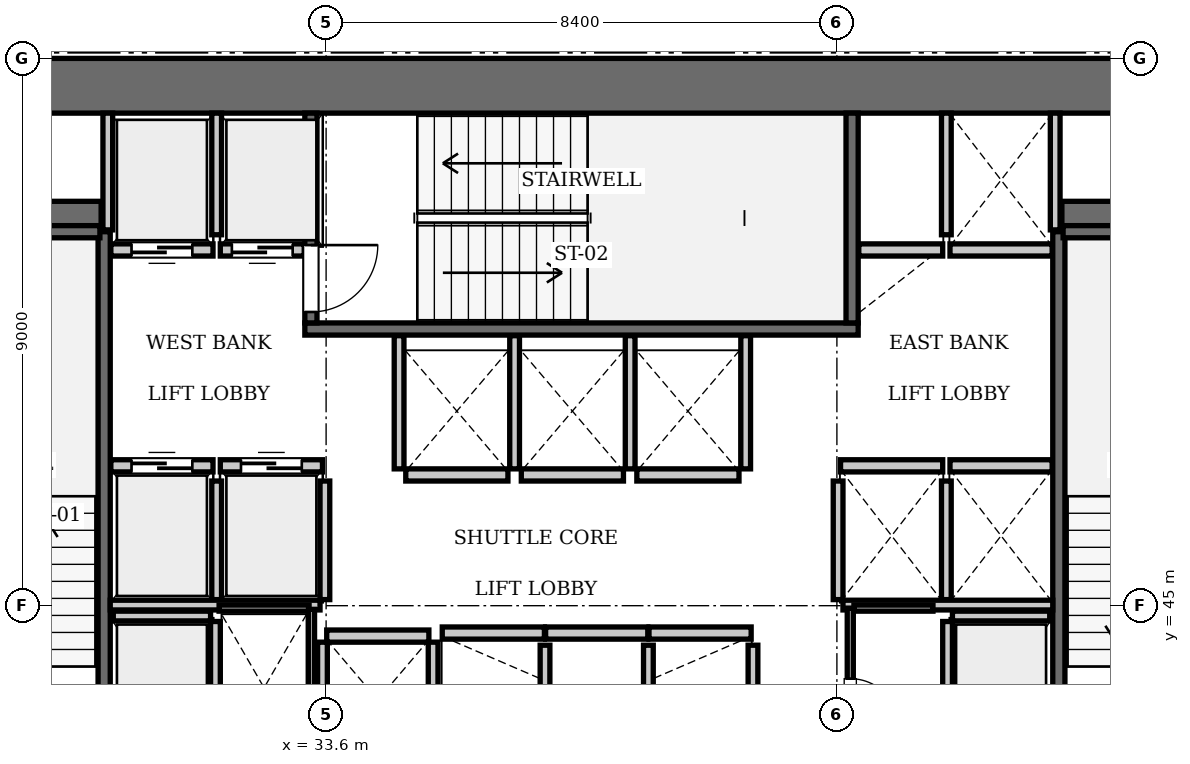
"""IFC4 building model, lengths in metres.
Left out: names, types, materials, properties, quantities, classifications, styles, units other than length and angle.
Written with IfcOpenShell. Run it as: python <this file> out.ifc"""

import sys

from ifc_helpers import new_model, si_unit, direction, frame, frame_2d, origin, place, context, subcontext, project, spatial, rectangle, extrude, element, fill, save


model = new_model("IFC4")
c1 = context("Model", 3, precision=1e-05, world=origin(), true_north=direction((0.0, 1.0)))
c2 = subcontext(c1, "Body", "Model", "MODEL_VIEW")
j1 = project(units=[si_unit("LENGTHUNIT", "METRE"), si_unit("PLANEANGLEUNIT", "RADIAN")], contexts=[c1])
p1 = place(None, origin())
s1 = spatial("IfcSite", under=j1, at=p1, CompositionType="ELEMENT")
p2 = place(p1, origin())
s2 = spatial("IfcBuilding", under=s1, at=p2, CompositionType="ELEMENT")
p3 = place(p2, frame((0.0, 0.0, 34.65)))
s3 = spatial("IfcBuildingStorey", under=s2, at=p3, CompositionType="ELEMENT", Elevation=34.65)
p4 = place(p3, frame((25.2, 53.55, 0.0), z_axis=(0.0, 0.0, 1.0), x_axis=(1.0, 0.0, 0.0)))
e1 = element("IfcWall", 1, at=p4, inside=s3, PredefinedType="SHEAR", context=c2, shape_type="SweptSolid", body=[
    extrude(rectangle(XDim=25.2, YDim=0.9, at=frame_2d((12.6, 0.0))), origin(), (0.0, 0.0, 1.0), 3.85),
])
p5 = place(p3, frame((26.1, 51.4, 0.0), z_axis=(0.0, 0.0, 1.0), x_axis=(1.0, 0.0, 0.0)))
e2 = element("IfcWall", 2, at=p5, inside=s3, PredefinedType="SHEAR", context=c2, shape_type="SweptSolid", body=[
    extrude(rectangle(XDim=3.8, YDim=0.5, at=frame_2d((1.9, 0.0))), origin(), (0.0, 0.0, 1.0), 3.85),
])
p6 = place(p3, frame((45.7, 51.4, 0.0), z_axis=(0.0, 0.0, 1.0), x_axis=(1.0, 0.0, 0.0)))
e3 = element("IfcWall", 3, at=p6, inside=s3, PredefinedType="SHEAR", context=c2, shape_type="SweptSolid", body=[
    extrude(rectangle(XDim=3.8, YDim=0.5, at=frame_2d((1.9, 0.0))), origin(), (0.0, 0.0, 1.0), 3.85),
])
p7 = place(p3, frame((29.95, 42.3, 0.0), z_axis=(0.0, 0.0, 1.0), x_axis=(0.0, 1.0, 0.0)))
e4 = element("IfcWall", 4, at=p7, inside=s3, PredefinedType="SOLIDWALL", context=c2, shape_type="SweptSolid", body=[
    extrude(rectangle(XDim=8.85, YDim=0.2, at=frame_2d((4.425, 0.0))), origin(), (0.0, 0.0, 1.0), 3.61),
])
p8 = place(p3, frame((26.38, 51.15, 0.0), z_axis=(0.0, 0.0, 1.0), x_axis=(1.0, 0.0, 0.0)))
e5 = element("IfcWall", 5, at=p8, inside=s3, PredefinedType="SOLIDWALL", context=c2, shape_type="SweptSolid", body=[
    extrude(rectangle(XDim=3.5, YDim=0.2, at=frame_2d((1.75, 0.0))), origin(), (0.0, 0.0, 1.0), 3.61),
])
p9 = place(p3, frame((33.25, 49.55, 0.0), z_axis=(0.0, 0.0, 1.0), x_axis=(1.0, 0.0, 0.0)))
e6 = element("IfcWall", 6, at=p9, inside=s3, PredefinedType="SOLIDWALL", context=c2, shape_type="SweptSolid", body=[
    extrude(rectangle(XDim=9.1, YDim=0.2, at=frame_2d((4.55, 0.0))), origin(), (0.0, 0.0, 1.0), 3.61),
])
p10 = place(p3, frame((42.25, 49.65, 0.0), z_axis=(0.0, 0.0, 1.0), x_axis=(0.0, 1.0, 0.0)))
e7 = element("IfcWall", 7, at=p10, inside=s3, PredefinedType="SOLIDWALL", context=c2, shape_type="SweptSolid", body=[
    extrude(rectangle(XDim=3.45, YDim=0.2, at=frame_2d((1.725, 0.0))), origin(), (0.0, 0.0, 1.0), 3.61),
])
p11 = place(p3, frame((33.35, 49.65, 0.0), z_axis=(0.0, 0.0, 1.0), x_axis=(0.0, 1.0, 0.0)))
e8 = element("IfcWall", 8, at=p11, inside=s3, PredefinedType="SOLIDWALL", context=c2, shape_type="SweptSolid", body=[
    extrude(rectangle(XDim=3.45, YDim=0.2, at=frame_2d((1.725, 0.0))), origin(), (0.0, 0.0, 1.0), 3.61),
])
p12 = place(p11, frame((0.18, 0.0, 0.0)))
e9 = element("IfcOpeningElement", 9, at=p12, cuts=e8, PredefinedType="OPENING", context=c2, shape_type="SweptSolid", body=[
    extrude(rectangle(XDim=1.1, YDim=2.15, at=frame_2d((0.55, 1.075))), frame((0.0, 0.11, 0.0), z_axis=(0.0, -1.0, 0.0), x_axis=(1.0, 0.0, 0.0)), (0.0, 0.0, 1.0), 0.22),
])
p13 = place(p3, frame((45.65, 42.3, 0.0), z_axis=(0.0, 0.0, 1.0), x_axis=(0.0, 1.0, 0.0)))
e10 = element("IfcWall", 10, at=p13, inside=s3, PredefinedType="SOLIDWALL", context=c2, shape_type="SweptSolid", body=[
    extrude(rectangle(XDim=8.85, YDim=0.2, at=frame_2d((4.425, 0.0))), origin(), (0.0, 0.0, 1.0), 3.61),
])
p14 = place(p3, frame((45.72, 51.15, 0.0), z_axis=(0.0, 0.0, 1.0), x_axis=(1.0, 0.0, 0.0)))
e11 = element("IfcWall", 11, at=p14, inside=s3, PredefinedType="SOLIDWALL", context=c2, shape_type="SweptSolid", body=[
    extrude(rectangle(XDim=3.5, YDim=0.2, at=frame_2d((1.75, 0.0))), origin(), (0.0, 0.0, 1.0), 3.61),
])
p15 = place(p3, frame((30.06, 47.3, 0.0), z_axis=(0.0, 0.0, 1.0), x_axis=(1.0, 0.0, 0.0)))
e12 = element("IfcWall", 12, at=p15, inside=s3, PredefinedType="SOLIDWALL", context=c2, shape_type="SweptSolid", body=[
    extrude(rectangle(XDim=1.68, YDim=0.2, at=frame_2d((0.84, 0.0))), origin(), (0.0, 0.0, 1.0), 3.61),
])
p16 = place(p15, frame((0.34, 0.0, 0.0)))
e13 = element("IfcOpeningElement", 13, at=p16, cuts=e12, PredefinedType="OPENING", context=c2, shape_type="SweptSolid", body=[
    extrude(rectangle(XDim=1.0, YDim=2.15, at=frame_2d((0.5, 1.075))), frame((0.0, 0.11, 0.0), z_axis=(0.0, -1.0, 0.0), x_axis=(1.0, 0.0, 0.0)), (0.0, 0.0, 1.0), 0.22),
])
p17 = place(p3, frame((31.86, 47.3, 0.0), z_axis=(0.0, 0.0, 1.0), x_axis=(1.0, 0.0, 0.0)))
e14 = element("IfcWall", 14, at=p17, inside=s3, PredefinedType="SOLIDWALL", context=c2, shape_type="SweptSolid", body=[
    extrude(rectangle(XDim=1.68, YDim=0.2, at=frame_2d((0.84, 0.0))), origin(), (0.0, 0.0, 1.0), 3.61),
])
p18 = place(p17, frame((0.34, 0.0, 0.0)))
e15 = element("IfcOpeningElement", 15, at=p18, cuts=e14, PredefinedType="OPENING", context=c2, shape_type="SweptSolid", body=[
    extrude(rectangle(XDim=1.0, YDim=2.15, at=frame_2d((0.5, 1.075))), frame((0.0, 0.11, 0.0), z_axis=(0.0, -1.0, 0.0), x_axis=(1.0, 0.0, 0.0)), (0.0, 0.0, 1.0), 0.22),
])
p19 = place(p3, frame((30.06, 50.85, 0.0), z_axis=(0.0, 0.0, 1.0), x_axis=(1.0, 0.0, 0.0)))
e16 = element("IfcWall", 16, at=p19, inside=s3, PredefinedType="SOLIDWALL", context=c2, shape_type="SweptSolid", body=[
    extrude(rectangle(XDim=1.68, YDim=0.2, at=frame_2d((0.84, 0.0))), origin(), (0.0, 0.0, 1.0), 3.61),
])
p20 = place(p19, frame((0.34, 0.0, 0.0)))
e17 = element("IfcOpeningElement", 17, at=p20, cuts=e16, PredefinedType="OPENING", context=c2, shape_type="SweptSolid", body=[
    extrude(rectangle(XDim=1.0, YDim=2.15, at=frame_2d((0.5, 1.075))), frame((0.0, 0.11, 0.0), z_axis=(0.0, -1.0, 0.0), x_axis=(1.0, 0.0, 0.0)), (0.0, 0.0, 1.0), 0.22),
])
p21 = place(p3, frame((31.86, 50.85, 0.0), z_axis=(0.0, 0.0, 1.0), x_axis=(1.0, 0.0, 0.0)))
e18 = element("IfcWall", 18, at=p21, inside=s3, PredefinedType="SOLIDWALL", context=c2, shape_type="SweptSolid", body=[
    extrude(rectangle(XDim=1.38, YDim=0.2, at=frame_2d((0.69, 0.0))), origin(), (0.0, 0.0, 1.0), 3.61),
])
p22 = place(p21, frame((0.19, 0.0, 0.0)))
e19 = element("IfcOpeningElement", 19, at=p22, cuts=e18, PredefinedType="OPENING", context=c2, shape_type="SweptSolid", body=[
    extrude(rectangle(XDim=1.0, YDim=2.15, at=frame_2d((0.5, 1.075))), frame((0.0, 0.11, 0.0), z_axis=(0.0, -1.0, 0.0), x_axis=(1.0, 0.0, 0.0)), (0.0, 0.0, 1.0), 0.22),
])
for number, where, z_axis, x_axis in (
    (20, (42.06, 47.3, 0.0), (0.0, 0.0, 1.0), (1.0, 0.0, 0.0)),
    (21, (43.86, 47.3, 0.0), (0.0, 0.0, 1.0), (1.0, 0.0, 0.0)),
):
    element("IfcWall", number, at=place(p3, frame(where, z_axis=z_axis, x_axis=x_axis)), inside=s3, PredefinedType="SOLIDWALL", context=c2, shape_type="SweptSolid", body=[
        extrude(rectangle(XDim=1.68, YDim=0.2, at=frame_2d((0.84, 0.0))), origin(), (0.0, 0.0, 1.0), 3.61),
    ])
p23 = place(p3, frame((42.36, 50.85, 0.0), z_axis=(0.0, 0.0, 1.0), x_axis=(1.0, 0.0, 0.0)))
e22 = element("IfcWall", 22, at=p23, inside=s3, PredefinedType="SOLIDWALL", context=c2, shape_type="SweptSolid", body=[
    extrude(rectangle(XDim=1.38, YDim=0.2, at=frame_2d((0.69, 0.0))), origin(), (0.0, 0.0, 1.0), 3.61),
])
for number, where, z_axis, x_axis in (
    (23, (43.86, 50.85, 0.0), (0.0, 0.0, 1.0), (1.0, 0.0, 0.0)),
    (24, (35.51, 44.55, 0.0), (0.0, 0.0, 1.0), (1.0, 0.0, 0.0)),
    (25, (37.21, 44.55, 0.0), (0.0, 0.0, 1.0), (1.0, 0.0, 0.0)),
):
    element("IfcWall", number, at=place(p3, frame(where, z_axis=z_axis, x_axis=x_axis)), inside=s3, PredefinedType="SOLIDWALL", context=c2, shape_type="SweptSolid", body=[
        extrude(rectangle(XDim=1.68, YDim=0.2, at=frame_2d((0.84, 0.0))), origin(), (0.0, 0.0, 1.0), 3.61),
    ])
for number, where, z_axis, x_axis in (
    (26, (38.91, 44.55, 0.0), (0.0, 0.0, 1.0), (1.0, 0.0, 0.0)),
    (27, (34.91, 47.15, 0.0), (0.0, 0.0, 1.0), (1.0, 0.0, 0.0)),
):
    element("IfcWall", number, at=place(p3, frame(where, z_axis=z_axis, x_axis=x_axis)), inside=s3, PredefinedType="SOLIDWALL", context=c2, shape_type="SweptSolid", body=[
        extrude(rectangle(XDim=1.68, YDim=0.2, at=frame_2d((0.84, 0.0))), origin(), (0.0, 0.0, 1.0), 3.61),
    ])
for number, where, z_axis, x_axis in (
    (28, (36.81, 47.15, 0.0), (0.0, 0.0, 1.0), (1.0, 0.0, 0.0)),
    (29, (38.71, 47.15, 0.0), (0.0, 0.0, 1.0), (1.0, 0.0, 0.0)),
    (30, (33.61, 44.5, 0.0), (0.0, 0.0, 1.0), (1.0, 0.0, 0.0)),
):
    element("IfcWall", number, at=place(p3, frame(where, z_axis=z_axis, x_axis=x_axis)), inside=s3, PredefinedType="SOLIDWALL", context=c2, shape_type="SweptSolid", body=[
        extrude(rectangle(XDim=1.68, YDim=0.2, at=frame_2d((0.84, 0.0))), origin(), (0.0, 0.0, 1.0), 3.61),
    ])
p24 = place(p3, frame((30.1, 44.83, 0.0), z_axis=(0.0, 0.0, 1.0), x_axis=(1.0, 0.0, 0.0)))
e31 = element("IfcWall", 31, at=p24, inside=s3, PredefinedType="SOLIDWALL", context=c2, shape_type="SweptSolid", body=[
    extrude(rectangle(XDim=1.6, YDim=0.16, at=frame_2d((0.8, 0.0))), origin(), (0.0, 0.0, 1.0), 3.61),
])
p25 = place(p3, frame((31.78, 42.3, 0.0), z_axis=(0.0, 0.0, 1.0), x_axis=(0.0, 1.0, 0.0)))
e32 = element("IfcWall", 32, at=p25, inside=s3, PredefinedType="SOLIDWALL", context=c2, shape_type="SweptSolid", body=[
    extrude(rectangle(XDim=2.44, YDim=0.16, at=frame_2d((1.22, 0.0))), origin(), (0.0, 0.0, 1.0), 3.61),
])
p26 = place(p3, frame((43.9, 44.83, 0.0), z_axis=(0.0, 0.0, 1.0), x_axis=(1.0, 0.0, 0.0)))
e33 = element("IfcWall", 33, at=p26, inside=s3, PredefinedType="SOLIDWALL", context=c2, shape_type="SweptSolid", body=[
    extrude(rectangle(XDim=1.6, YDim=0.16, at=frame_2d((0.8, 0.0))), origin(), (0.0, 0.0, 1.0), 3.61),
])
p27 = place(p3, frame((43.82, 42.3, 0.0), z_axis=(0.0, 0.0, 1.0), x_axis=(0.0, 1.0, 0.0)))
e34 = element("IfcWall", 34, at=p27, inside=s3, PredefinedType="SOLIDWALL", context=c2, shape_type="SweptSolid", body=[
    extrude(rectangle(XDim=2.44, YDim=0.16, at=frame_2d((1.22, 0.0))), origin(), (0.0, 0.0, 1.0), 3.61),
])
for number, where, z_axis, x_axis in (
    (35, (31.8, 45.1, 0.0), (0.0, 0.0, 1.0), (0.0, 1.0, 0.0)),
    (36, (33.58, 45.1, 0.0), (0.0, 0.0, 1.0), (0.0, 1.0, 0.0)),
):
    element("IfcWall", number, at=place(p3, frame(where, z_axis=z_axis, x_axis=x_axis)), inside=s3, PredefinedType="SOLIDWALL", context=c2, shape_type="SweptSolid", body=[
        extrude(rectangle(XDim=1.95, YDim=0.16, at=frame_2d((0.975, 0.0))), origin(), (0.0, 0.0, 1.0), 3.61),
    ])
p28 = place(p3, frame((30.05, 45.01, 0.0), z_axis=(0.0, 0.0, 1.0), x_axis=(1.0, 0.0, 0.0)))
e37 = element("IfcWall", 37, at=p28, inside=s3, PredefinedType="SOLIDWALL", context=c2, shape_type="SweptSolid", body=[
    extrude(rectangle(XDim=3.45, YDim=0.16, at=frame_2d((1.725, 0.0))), origin(), (0.0, 0.0, 1.0), 3.61),
])
p29 = place(p3, frame((30.01, 51.18, 0.0), z_axis=(0.0, 0.0, 1.0), x_axis=(0.0, 1.0, 0.0)))
e38 = element("IfcWall", 38, at=p29, inside=s3, PredefinedType="SOLIDWALL", context=c2, shape_type="SweptSolid", body=[
    extrude(rectangle(XDim=1.92, YDim=0.16, at=frame_2d((0.96, 0.0))), origin(), (0.0, 0.0, 1.0), 3.61),
])
p30 = place(p3, frame((31.8, 51.1, 0.0), z_axis=(0.0, 0.0, 1.0), x_axis=(0.0, 1.0, 0.0)))
e39 = element("IfcWall", 39, at=p30, inside=s3, PredefinedType="SOLIDWALL", context=c2, shape_type="SweptSolid", body=[
    extrude(rectangle(XDim=2.0, YDim=0.16, at=frame_2d((1.0, 0.0))), origin(), (0.0, 0.0, 1.0), 3.61),
])
for number, where, z_axis, x_axis in (
    (40, (42.02, 45.1, 0.0), (0.0, 0.0, 1.0), (0.0, 1.0, 0.0)),
    (41, (43.8, 45.1, 0.0), (0.0, 0.0, 1.0), (0.0, 1.0, 0.0)),
):
    element("IfcWall", number, at=place(p3, frame(where, z_axis=z_axis, x_axis=x_axis)), inside=s3, PredefinedType="SOLIDWALL", context=c2, shape_type="SweptSolid", body=[
        extrude(rectangle(XDim=1.95, YDim=0.16, at=frame_2d((0.975, 0.0))), origin(), (0.0, 0.0, 1.0), 3.61),
    ])
p31 = place(p3, frame((42.1, 45.01, 0.0), z_axis=(0.0, 0.0, 1.0), x_axis=(1.0, 0.0, 0.0)))
e42 = element("IfcWall", 42, at=p31, inside=s3, PredefinedType="SOLIDWALL", context=c2, shape_type="SweptSolid", body=[
    extrude(rectangle(XDim=3.45, YDim=0.16, at=frame_2d((1.725, 0.0))), origin(), (0.0, 0.0, 1.0), 3.61),
])
p32 = place(p3, frame((45.59, 51.18, 0.0), z_axis=(0.0, 0.0, 1.0), x_axis=(0.0, 1.0, 0.0)))
e43 = element("IfcWall", 43, at=p32, inside=s3, PredefinedType="SOLIDWALL", context=c2, shape_type="SweptSolid", body=[
    extrude(rectangle(XDim=1.92, YDim=0.16, at=frame_2d((0.96, 0.0))), origin(), (0.0, 0.0, 1.0), 3.61),
])
p33 = place(p3, frame((43.8, 51.1, 0.0), z_axis=(0.0, 0.0, 1.0), x_axis=(0.0, 1.0, 0.0)))
e44 = element("IfcWall", 44, at=p33, inside=s3, PredefinedType="SOLIDWALL", context=c2, shape_type="SweptSolid", body=[
    extrude(rectangle(XDim=2.0, YDim=0.16, at=frame_2d((1.0, 0.0))), origin(), (0.0, 0.0, 1.0), 3.61),
])
for number, where, z_axis, x_axis in (
    (45, (37.2, 42.3, 0.0), (0.0, 0.0, 1.0), (0.0, 1.0, 0.0)),
    (46, (38.9, 42.3, 0.0), (0.0, 0.0, 1.0), (0.0, 1.0, 0.0)),
    (47, (40.62, 42.3, 0.0), (0.0, 0.0, 1.0), (0.0, 1.0, 0.0)),
):
    element("IfcWall", number, at=place(p3, frame(where, z_axis=z_axis, x_axis=x_axis)), inside=s3, PredefinedType="SOLIDWALL", context=c2, shape_type="SweptSolid", body=[
        extrude(rectangle(XDim=2.05, YDim=0.16, at=frame_2d((1.025, 0.0))), origin(), (0.0, 0.0, 1.0), 3.61),
    ])
for number, where, z_axis, x_axis in (
    (48, (34.8, 47.25, 0.0), (0.0, 0.0, 1.0), (0.0, 1.0, 0.0)),
    (49, (36.7, 47.25, 0.0), (0.0, 0.0, 1.0), (0.0, 1.0, 0.0)),
    (50, (38.6, 47.25, 0.0), (0.0, 0.0, 1.0), (0.0, 1.0, 0.0)),
    (51, (40.5, 47.25, 0.0), (0.0, 0.0, 1.0), (0.0, 1.0, 0.0)),
):
    element("IfcWall", number, at=place(p3, frame(where, z_axis=z_axis, x_axis=x_axis)), inside=s3, PredefinedType="SOLIDWALL", context=c2, shape_type="SweptSolid", body=[
        extrude(rectangle(XDim=2.19, YDim=0.16, at=frame_2d((1.095, 0.0))), origin(), (0.0, 0.0, 1.0), 3.61),
    ])
for number, where, z_axis, x_axis in (
    (52, (33.54, 42.3, 0.0), (0.0, 0.0, 1.0), (0.0, 1.0, 0.0)),
    (53, (35.36, 42.3, 0.0), (0.0, 0.0, 1.0), (0.0, 1.0, 0.0)),
):
    element("IfcWall", number, at=place(p3, frame(where, z_axis=z_axis, x_axis=x_axis)), inside=s3, PredefinedType="SOLIDWALL", context=c2, shape_type="SweptSolid", body=[
        extrude(rectangle(XDim=2.1, YDim=0.16, at=frame_2d((1.05, 0.0))), origin(), (0.0, 0.0, 1.0), 3.61),
    ])
p34 = place(p3, frame((31.84, 44.96, 0.0), z_axis=(0.0, 0.0, 1.0), x_axis=(1.0, 0.0, 0.0)))
e54 = element("IfcWall", 54, at=p34, inside=s3, PredefinedType="PARTITIONING", context=c2, shape_type="SweptSolid", body=[
    extrude(rectangle(XDim=1.48, YDim=0.1, at=frame_2d((0.74, 0.0))), origin(), (0.0, 0.0, 1.0), 3.61),
])
p35 = place(p3, frame((33.36, 42.36, 0.0), z_axis=(0.0, 0.0, 1.0), x_axis=(0.0, 1.0, 0.0)))
e55 = element("IfcWall", 55, at=p35, inside=s3, PredefinedType="PARTITIONING", context=c2, shape_type="SweptSolid", body=[
    extrude(rectangle(XDim=2.58, YDim=0.1, at=frame_2d((1.29, 0.0))), origin(), (0.0, 0.0, 1.0), 3.61),
])
p36 = place(p3, frame((42.22, 42.35, 0.0), z_axis=(0.0, 0.0, 1.0), x_axis=(0.0, 1.0, 0.0)))
e56 = element("IfcWall", 56, at=p36, inside=s3, PredefinedType="PARTITIONING", context=c2, shape_type="SweptSolid", body=[
    extrude(rectangle(XDim=2.61, YDim=0.1, at=frame_2d((1.305, 0.0))), origin(), (0.0, 0.0, 1.0), 3.61),
])
p37 = place(p36, frame((0.65, 0.0, 0.0)))
e57 = element("IfcOpeningElement", 57, at=p37, cuts=e56, PredefinedType="OPENING", context=c2, shape_type="SweptSolid", body=[
    extrude(rectangle(XDim=0.8, YDim=2.05, at=frame_2d((0.4, 1.025))), frame((0.0, 0.06, 0.0), z_axis=(0.0, -1.0, 0.0), x_axis=(1.0, 0.0, 0.0)), (0.0, 0.0, 1.0), 0.12),
])
p38 = place(p3, frame((42.28, 44.96, 0.0), z_axis=(0.0, 0.0, 1.0), x_axis=(1.0, 0.0, 0.0)))
e58 = element("IfcWall", 58, at=p38, inside=s3, PredefinedType="PARTITIONING", context=c2, shape_type="SweptSolid", body=[
    extrude(rectangle(XDim=1.3, YDim=0.1, at=frame_2d((0.65, 0.0))), origin(), (0.0, 0.0, 1.0), 3.61),
])
p39 = place(p12, frame((1.1, 0.0, 0.0), z_axis=(0.0, 0.0, 1.0), x_axis=(-1.0, 0.0, 0.0)))
e59 = element("IfcDoor", 59, at=p39, inside=s3, OperationType="SINGLE_SWING_LEFT", PredefinedType="DOOR", context=c2, shape_type="SweptSolid", body=[
    extrude(rectangle(XDim=1.1, YDim=2.15, at=frame_2d((0.55, 1.075))), frame((0.0, 0.025, 0.0), z_axis=(0.0, -1.0, 0.0), x_axis=(1.0, 0.0, 0.0)), (0.0, 0.0, 1.0), 0.05),
])
fill(e9, e59)
p40 = place(p16, origin())
e60 = element("IfcDoor", 60, at=p40, inside=s3, OperationType="SLIDING_TO_LEFT", PredefinedType="DOOR", context=c2, shape_type="SweptSolid", body=[
    extrude(rectangle(XDim=1.0, YDim=2.15, at=frame_2d((0.5, 1.075))), frame((0.0, 0.025, 0.0), z_axis=(0.0, -1.0, 0.0), x_axis=(1.0, 0.0, 0.0)), (0.0, 0.0, 1.0), 0.05),
])
fill(e13, e60)
p41 = place(p18, origin())
e61 = element("IfcDoor", 61, at=p41, inside=s3, OperationType="SLIDING_TO_LEFT", PredefinedType="DOOR", context=c2, shape_type="SweptSolid", body=[
    extrude(rectangle(XDim=1.0, YDim=2.15, at=frame_2d((0.5, 1.075))), frame((0.0, 0.025, 0.0), z_axis=(0.0, -1.0, 0.0), x_axis=(1.0, 0.0, 0.0)), (0.0, 0.0, 1.0), 0.05),
])
fill(e15, e61)
p42 = place(p20, frame((1.0, 0.0, 0.0), z_axis=(0.0, 0.0, 1.0), x_axis=(-1.0, 0.0, 0.0)))
e62 = element("IfcDoor", 62, at=p42, inside=s3, OperationType="SLIDING_TO_LEFT", PredefinedType="DOOR", context=c2, shape_type="SweptSolid", body=[
    extrude(rectangle(XDim=1.0, YDim=2.15, at=frame_2d((0.5, 1.075))), frame((0.0, 0.025, 0.0), z_axis=(0.0, -1.0, 0.0), x_axis=(1.0, 0.0, 0.0)), (0.0, 0.0, 1.0), 0.05),
])
fill(e17, e62)
p43 = place(p22, frame((1.0, 0.0, 0.0), z_axis=(0.0, 0.0, 1.0), x_axis=(-1.0, 0.0, 0.0)))
e63 = element("IfcDoor", 63, at=p43, inside=s3, OperationType="SLIDING_TO_LEFT", PredefinedType="DOOR", context=c2, shape_type="SweptSolid", body=[
    extrude(rectangle(XDim=1.0, YDim=2.15, at=frame_2d((0.5, 1.075))), frame((0.0, 0.025, 0.0), z_axis=(0.0, -1.0, 0.0), x_axis=(1.0, 0.0, 0.0)), (0.0, 0.0, 1.0), 0.05),
])
fill(e19, e63)
p44 = place(p37, frame((0.8, 0.0, 0.0), z_axis=(0.0, 0.0, 1.0), x_axis=(-1.0, 0.0, 0.0)))
e64 = element("IfcDoor", 64, at=p44, inside=s3, OperationType="SINGLE_SWING_RIGHT", PredefinedType="DOOR", context=c2, shape_type="SweptSolid", body=[
    extrude(rectangle(XDim=0.8, YDim=2.05, at=frame_2d((0.4, 1.025))), frame((0.0, 0.025, 0.0), z_axis=(0.0, -1.0, 0.0), x_axis=(1.0, 0.0, 0.0)), (0.0, 0.0, 1.0), 0.05),
])
fill(e57, e64)
save(model, sys.argv[1])
